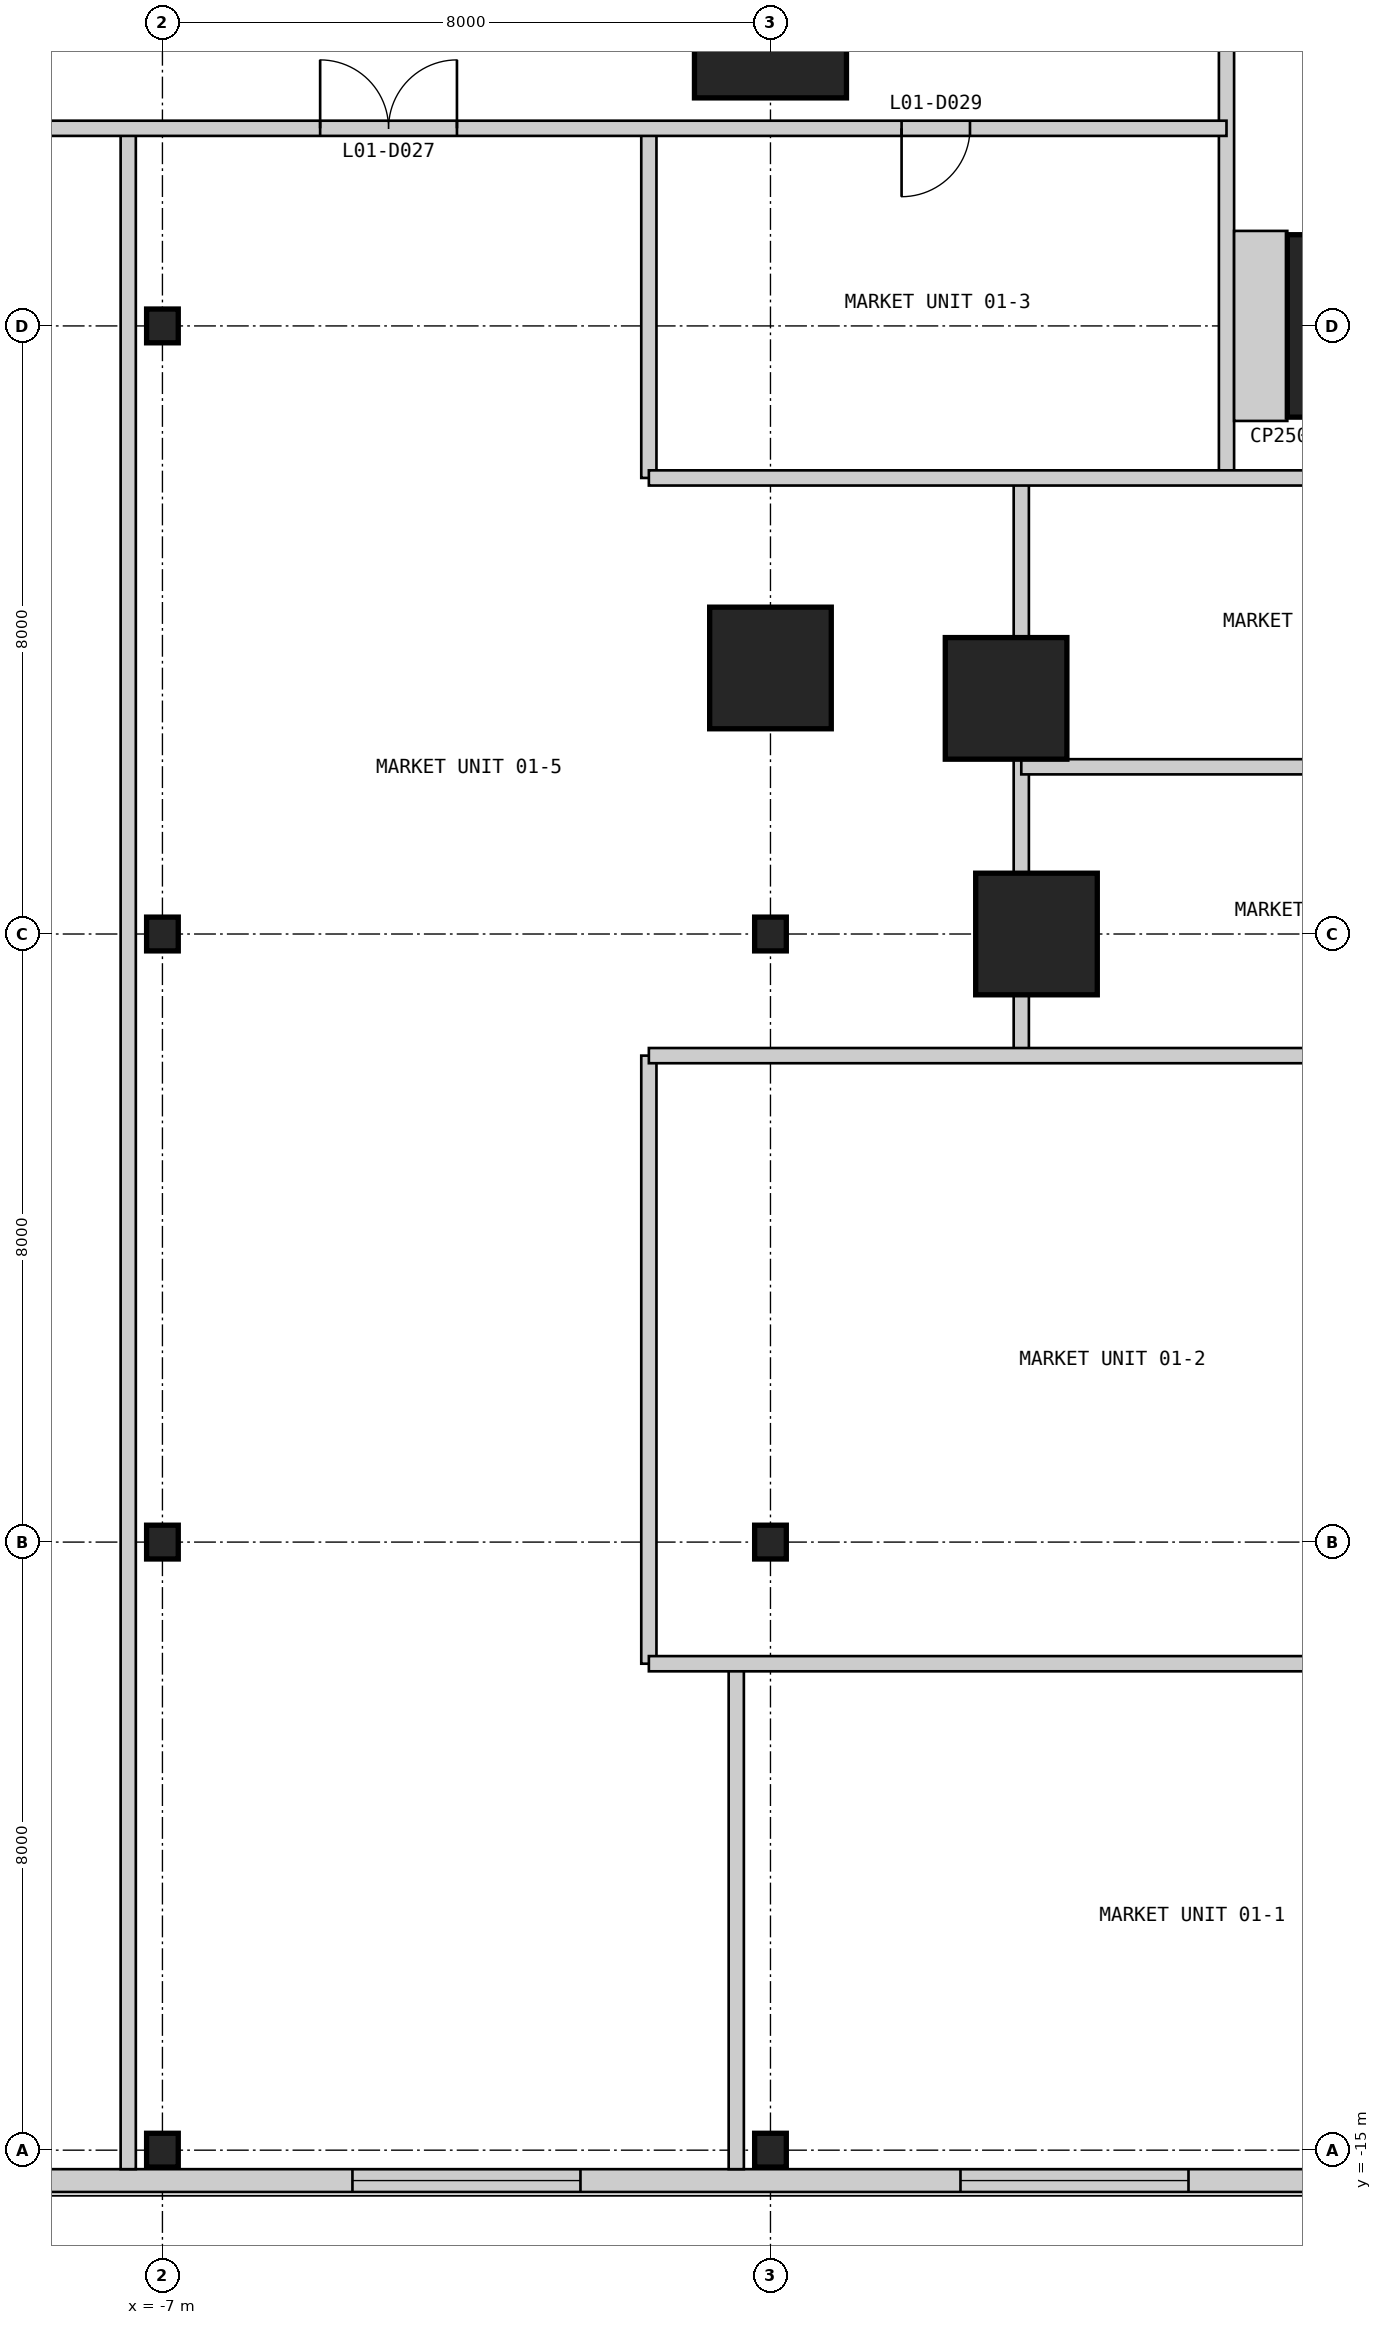
"""IFC4 building model, lengths in metres.
Left out: names, types, materials, properties, quantities, classifications, styles, units other than length and angle.
Written with IfcOpenShell. Run it as: python <this file> out.ifc"""

import sys

from ifc_helpers import new_model, si_unit, direction, frame, frame_2d, origin, origin_2d, place, context, subcontext, project, spatial, rectangle, i_section, extrude, element, fill, save


model = new_model("IFC4")
c1 = context("Model", 3, precision=1e-05, world=origin(), true_north=direction((0.0, 1.0)))
c2 = subcontext(c1, "Body", "Model", "MODEL_VIEW")
j1 = project(units=[si_unit("LENGTHUNIT", "METRE"), si_unit("PLANEANGLEUNIT", "RADIAN")], contexts=[c1])
p1 = place(None, origin())
s1 = spatial("IfcSite", under=j1, at=p1, CompositionType="ELEMENT")
p2 = place(p1, origin())
s2 = spatial("IfcBuilding", under=s1, at=p2, CompositionType="ELEMENT")
p3 = place(p2, frame((0.0, 0.0, 7.0)))
s3 = spatial("IfcBuildingStorey", under=s2, at=p3, CompositionType="ELEMENT", Elevation=7.0)
p4 = place(p3, frame((9.0, 9.0, 0.0), z_axis=(0.0, 0.0, 1.0), x_axis=(1.0, 0.0, 0.0)))
e1 = element("IfcColumn", 1, at=p4, inside=s3, PredefinedType="COLUMN", context=c2, shape_type="SweptSolid", body=[
    extrude(rectangle(XDim=2.4, YDim=2.4, at=origin_2d()), origin(), (0.0, 0.0, 1.0), 4.8),
])
p5 = place(p3, frame((4.5, 1.0, 0.0), z_axis=(0.0, 0.0, 1.0), x_axis=(1.0, 0.0, 0.0)))
e2 = element("IfcColumn", 2, at=p5, inside=s3, PredefinedType="COLUMN", context=c2, shape_type="SweptSolid", body=[
    extrude(rectangle(XDim=1.6, YDim=1.6, at=origin_2d()), origin(), (0.0, 0.0, 1.0), 4.8),
])
p6 = place(p3, frame((1.0, 13.0, 0.0), z_axis=(0.0, 0.0, 1.0), x_axis=(1.0, 0.0, 0.0)))
e3 = element("IfcColumn", 3, at=p6, inside=s3, PredefinedType="COLUMN", context=c2, shape_type="SweptSolid", body=[
    extrude(rectangle(XDim=2.0, YDim=2.0, at=origin_2d()), origin(), (0.0, 0.0, 1.0), 4.8),
])
for number, where, z_axis, x_axis in (
    (4, (1.0, 4.5, 0.0), (0.0, 0.0, 1.0), (1.0, 0.0, 0.0)),
    (5, (4.1, 4.1, 0.0), (0.0, 0.0, 1.0), (1.0, 0.0, 0.0)),
):
    element("IfcColumn", number, at=place(p3, frame(where, z_axis=z_axis, x_axis=x_axis)), inside=s3, PredefinedType="COLUMN", context=c2, shape_type="SweptSolid", body=[
        extrude(rectangle(XDim=1.6, YDim=1.6, at=origin_2d()), origin(), (0.0, 0.0, 1.0), 4.8),
    ])
for number, where, z_axis, x_axis in (
    (6, (-7.0, -15.0, 0.0), (0.0, 0.0, 1.0), (1.0, 0.0, 0.0)),
    (7, (-7.0, -7.0, 0.0), (0.0, 0.0, 1.0), (1.0, 0.0, 0.0)),
    (8, (-7.0, 1.0, 0.0), (0.0, 0.0, 1.0), (1.0, 0.0, 0.0)),
    (9, (-7.0, 9.0, 0.0), (0.0, 0.0, 1.0), (1.0, 0.0, 0.0)),
    (10, (1.0, -15.0, 0.0), (0.0, 0.0, 1.0), (1.0, 0.0, 0.0)),
    (11, (1.0, -7.0, 0.0), (0.0, 0.0, 1.0), (1.0, 0.0, 0.0)),
    (12, (1.0, 1.0, 0.0), (0.0, 0.0, 1.0), (1.0, 0.0, 0.0)),
):
    element("IfcColumn", number, at=place(p3, frame(where, z_axis=z_axis, x_axis=x_axis)), inside=s3, PredefinedType="COLUMN", context=c2, shape_type="SweptSolid", body=[
        extrude(i_section(OverallWidth=0.417, OverallDepth=0.445, WebThickness=0.039, FlangeThickness=0.063, at=origin_2d()), origin(), (0.0, 0.0, 1.0), 4.8),
    ])
p7 = place(p3, frame((-15.55, -15.4, 0.0), z_axis=(0.0, 0.0, 1.0), x_axis=(1.0, 0.0, 0.0)))
e13 = element("IfcWall", 13, at=p7, inside=s3, PredefinedType="SOLIDWALL", context=c2, shape_type="SweptSolid", body=[
    extrude(rectangle(XDim=81.1, YDim=0.3, at=frame_2d((40.55, 0.0))), origin(), (0.0, 0.0, 1.0), 4.5),
])
p8 = place(p7, frame((3.05, 0.0, 0.9)))
e14 = element("IfcOpeningElement", 14, at=p8, cuts=e13, PredefinedType="OPENING", context=c2, shape_type="SweptSolid", body=[
    extrude(rectangle(XDim=3.0, YDim=2.4, at=frame_2d((1.5, 1.2))), frame((0.0, 0.16, 0.0), z_axis=(0.0, -1.0, 0.0), x_axis=(1.0, 0.0, 0.0)), (0.0, 0.0, 1.0), 0.32),
])
p9 = place(p7, frame((11.05, 0.0, 0.9)))
e15 = element("IfcOpeningElement", 15, at=p9, cuts=e13, PredefinedType="OPENING", context=c2, shape_type="SweptSolid", body=[
    extrude(rectangle(XDim=3.0, YDim=2.4, at=frame_2d((1.5, 1.2))), frame((0.0, 0.16, 0.0), z_axis=(0.0, -1.0, 0.0), x_axis=(1.0, 0.0, 0.0)), (0.0, 0.0, 1.0), 0.32),
])
p10 = place(p7, frame((19.05, 0.0, 0.9)))
e16 = element("IfcOpeningElement", 16, at=p10, cuts=e13, PredefinedType="OPENING", context=c2, shape_type="SweptSolid", body=[
    extrude(rectangle(XDim=3.0, YDim=2.4, at=frame_2d((1.5, 1.2))), frame((0.0, 0.16, 0.0), z_axis=(0.0, -1.0, 0.0), x_axis=(1.0, 0.0, 0.0)), (0.0, 0.0, 1.0), 0.32),
])
p11 = place(p7, frame((33.05, 0.0, 0.9)))
e17 = element("IfcOpeningElement", 17, at=p11, cuts=e13, PredefinedType="OPENING", context=c2, shape_type="SweptSolid", body=[
    extrude(rectangle(XDim=3.0, YDim=2.4, at=frame_2d((1.5, 1.2))), frame((0.0, 0.16, 0.0), z_axis=(0.0, -1.0, 0.0), x_axis=(1.0, 0.0, 0.0)), (0.0, 0.0, 1.0), 0.32),
])
p12 = place(p7, frame((45.05, 0.0, 0.9)))
e18 = element("IfcOpeningElement", 18, at=p12, cuts=e13, PredefinedType="OPENING", context=c2, shape_type="SweptSolid", body=[
    extrude(rectangle(XDim=3.0, YDim=2.4, at=frame_2d((1.5, 1.2))), frame((0.0, 0.16, 0.0), z_axis=(0.0, -1.0, 0.0), x_axis=(1.0, 0.0, 0.0)), (0.0, 0.0, 1.0), 0.32),
])
p13 = place(p7, frame((53.55, 0.0, 0.9)))
e19 = element("IfcOpeningElement", 19, at=p13, cuts=e13, PredefinedType="OPENING", context=c2, shape_type="SweptSolid", body=[
    extrude(rectangle(XDim=3.0, YDim=2.4, at=frame_2d((1.5, 1.2))), frame((0.0, 0.16, 0.0), z_axis=(0.0, -1.0, 0.0), x_axis=(1.0, 0.0, 0.0)), (0.0, 0.0, 1.0), 0.32),
])
p14 = place(p7, frame((59.55, 0.0, 0.9)))
e20 = element("IfcOpeningElement", 20, at=p14, cuts=e13, PredefinedType="OPENING", context=c2, shape_type="SweptSolid", body=[
    extrude(rectangle(XDim=3.0, YDim=2.4, at=frame_2d((1.5, 1.2))), frame((0.0, 0.16, 0.0), z_axis=(0.0, -1.0, 0.0), x_axis=(1.0, 0.0, 0.0)), (0.0, 0.0, 1.0), 0.32),
])
p15 = place(p7, frame((67.05, 0.0, 0.9)))
e21 = element("IfcOpeningElement", 21, at=p15, cuts=e13, PredefinedType="OPENING", context=c2, shape_type="SweptSolid", body=[
    extrude(rectangle(XDim=3.0, YDim=2.4, at=frame_2d((1.5, 1.2))), frame((0.0, 0.16, 0.0), z_axis=(0.0, -1.0, 0.0), x_axis=(1.0, 0.0, 0.0)), (0.0, 0.0, 1.0), 0.32),
])
p16 = place(p7, frame((75.05, 0.0, 0.9)))
e22 = element("IfcOpeningElement", 22, at=p16, cuts=e13, PredefinedType="OPENING", context=c2, shape_type="SweptSolid", body=[
    extrude(rectangle(XDim=3.0, YDim=2.4, at=frame_2d((1.5, 1.2))), frame((0.0, 0.16, 0.0), z_axis=(0.0, -1.0, 0.0), x_axis=(1.0, 0.0, 0.0)), (0.0, 0.0, 1.0), 0.32),
])
p17 = place(p3, frame((-7.45, -15.25, 0.0), z_axis=(0.0, 0.0, 1.0), x_axis=(0.0, 1.0, 0.0)))
e23 = element("IfcWall", 23, at=p17, inside=s3, PredefinedType="PARTITIONING", context=c2, shape_type="SweptSolid", body=[
    extrude(rectangle(XDim=26.85, YDim=0.2, at=frame_2d((13.425, 0.0))), origin(), (0.0, 0.0, 1.0), 4.5),
])
p18 = place(p3, frame((-0.6, -8.6, 0.0), z_axis=(0.0, 0.0, 1.0), x_axis=(0.0, 1.0, 0.0)))
e24 = element("IfcWall", 24, at=p18, inside=s3, PredefinedType="PARTITIONING", context=c2, shape_type="SweptSolid", body=[
    extrude(rectangle(XDim=8.0, YDim=0.2, at=frame_2d((4.0, 0.0))), origin(), (0.0, 0.0, 1.0), 4.5),
])
p19 = place(p3, frame((-0.6, 7.0, 0.0), z_axis=(0.0, 0.0, 1.0), x_axis=(0.0, 1.0, 0.0)))
e25 = element("IfcWall", 25, at=p19, inside=s3, PredefinedType="PARTITIONING", context=c2, shape_type="SweptSolid", body=[
    extrude(rectangle(XDim=4.6, YDim=0.2, at=frame_2d((2.3, 0.0))), origin(), (0.0, 0.0, 1.0), 4.5),
])
p20 = place(p3, frame((0.55, -15.25, 0.0), z_axis=(0.0, 0.0, 1.0), x_axis=(0.0, 1.0, 0.0)))
e26 = element("IfcWall", 26, at=p20, inside=s3, PredefinedType="PARTITIONING", context=c2, shape_type="SweptSolid", body=[
    extrude(rectangle(XDim=6.65, YDim=0.2, at=frame_2d((3.325, 0.0))), origin(), (0.0, 0.0, 1.0), 4.5),
])
p21 = place(p3, frame((4.3, -0.6, 0.0), z_axis=(0.0, 0.0, 1.0), x_axis=(0.0, 1.0, 0.0)))
e27 = element("IfcWall", 27, at=p21, inside=s3, PredefinedType="PARTITIONING", context=c2, shape_type="SweptSolid", body=[
    extrude(rectangle(XDim=0.8, YDim=0.2, at=frame_2d((0.4, 0.0))), origin(), (0.0, 0.0, 1.0), 4.5),
])
p22 = place(p3, frame((4.3, 1.8, 0.0), z_axis=(0.0, 0.0, 1.0), x_axis=(0.0, 1.0, 0.0)))
e28 = element("IfcWall", 28, at=p22, inside=s3, PredefinedType="PARTITIONING", context=c2, shape_type="SweptSolid", body=[
    extrude(rectangle(XDim=1.5, YDim=0.2, at=frame_2d((0.75, 0.0))), origin(), (0.0, 0.0, 1.0), 3.65),
])
p23 = place(p3, frame((4.3, 4.9, 0.0), z_axis=(0.0, 0.0, 1.0), x_axis=(0.0, 1.0, 0.0)))
e29 = element("IfcWall", 29, at=p23, inside=s3, PredefinedType="PARTITIONING", context=c2, shape_type="SweptSolid", body=[
    extrude(rectangle(XDim=2.1, YDim=0.2, at=frame_2d((1.05, 0.0))), origin(), (0.0, 0.0, 1.0), 4.5),
])
p24 = place(p3, frame((7.0, 7.0, 0.0), z_axis=(0.0, 0.0, 1.0), x_axis=(0.0, 1.0, 0.0)))
e30 = element("IfcWall", 30, at=p24, inside=s3, PredefinedType="PARTITIONING", context=c2, shape_type="SweptSolid", body=[
    extrude(rectangle(XDim=6.0, YDim=0.2, at=frame_2d((3.0, 0.0))), origin(), (0.0, 0.0, 1.0), 4.5),
])
p25 = place(p3, frame((-0.6, -8.6, 0.0), z_axis=(0.0, 0.0, 1.0), x_axis=(1.0, 0.0, 0.0)))
e31 = element("IfcWall", 31, at=p25, inside=s3, PredefinedType="PARTITIONING", context=c2, shape_type="SweptSolid", body=[
    extrude(rectangle(XDim=13.15, YDim=0.2, at=frame_2d((6.575, 0.0))), origin(), (0.0, 0.0, 1.0), 4.5),
])
p26 = place(p3, frame((-0.6, -0.6, 0.0), z_axis=(0.0, 0.0, 1.0), x_axis=(1.0, 0.0, 0.0)))
e32 = element("IfcWall", 32, at=p26, inside=s3, PredefinedType="PARTITIONING", context=c2, shape_type="SweptSolid", body=[
    extrude(rectangle(XDim=12.2, YDim=0.2, at=frame_2d((6.1, 0.0))), origin(), (0.0, 0.0, 1.0), 4.5),
])
p27 = place(p3, frame((4.3, 3.2, 0.0), z_axis=(0.0, 0.0, 1.0), x_axis=(1.0, 0.0, 0.0)))
e33 = element("IfcWall", 33, at=p27, inside=s3, PredefinedType="PARTITIONING", context=c2, shape_type="SweptSolid", body=[
    extrude(rectangle(XDim=7.3, YDim=0.2, at=frame_2d((3.65, 0.0))), origin(), (0.0, 0.0, 1.0), 4.5),
])
p28 = place(p3, frame((-0.6, 7.0, 0.0), z_axis=(0.0, 0.0, 1.0), x_axis=(1.0, 0.0, 0.0)))
e34 = element("IfcWall", 34, at=p28, inside=s3, PredefinedType="PARTITIONING", context=c2, shape_type="SweptSolid", body=[
    extrude(rectangle(XDim=17.0, YDim=0.2, at=frame_2d((8.5, 0.0))), origin(), (0.0, 0.0, 1.0), 4.5),
])
p29 = place(p28, frame((14.125, 0.0, 0.0)))
e35 = element("IfcOpeningElement", 35, at=p29, cuts=e34, PredefinedType="OPENING", context=c2, shape_type="SweptSolid", body=[
    extrude(rectangle(XDim=0.9, YDim=2.2, at=frame_2d((0.45, 1.1))), frame((0.0, 0.11, 0.0), z_axis=(0.0, -1.0, 0.0), x_axis=(1.0, 0.0, 0.0)), (0.0, 0.0, 1.0), 0.22),
])
p30 = place(p3, frame((-15.25, 11.6, 0.0), z_axis=(0.0, 0.0, 1.0), x_axis=(1.0, 0.0, 0.0)))
e36 = element("IfcWall", 36, at=p30, inside=s3, PredefinedType="PARTITIONING", context=c2, shape_type="SweptSolid", body=[
    extrude(rectangle(XDim=22.25, YDim=0.2, at=frame_2d((11.125, 0.0))), origin(), (0.0, 0.0, 1.0), 4.5),
])
p31 = place(p30, frame((10.325, 0.0, 0.0)))
e37 = element("IfcOpeningElement", 37, at=p31, cuts=e36, PredefinedType="OPENING", context=c2, shape_type="SweptSolid", body=[
    extrude(rectangle(XDim=1.8, YDim=2.4, at=frame_2d((0.9, 1.2))), frame((0.0, 0.11, 0.0), z_axis=(0.0, -1.0, 0.0), x_axis=(1.0, 0.0, 0.0)), (0.0, 0.0, 1.0), 0.22),
])
p32 = place(p30, frame((3.025, 0.0, 0.0)))
e38 = element("IfcOpeningElement", 38, at=p32, cuts=e36, PredefinedType="OPENING", context=c2, shape_type="SweptSolid", body=[
    extrude(rectangle(XDim=1.8, YDim=2.4, at=frame_2d((0.9, 1.2))), frame((0.0, 0.11, 0.0), z_axis=(0.0, -1.0, 0.0), x_axis=(1.0, 0.0, 0.0)), (0.0, 0.0, 1.0), 0.22),
])
p33 = place(p30, frame((17.975, 0.0, 0.0)))
e39 = element("IfcOpeningElement", 39, at=p33, cuts=e36, PredefinedType="OPENING", context=c2, shape_type="SweptSolid", body=[
    extrude(rectangle(XDim=0.9, YDim=2.2, at=frame_2d((0.45, 1.1))), frame((0.0, 0.11, 0.0), z_axis=(0.0, -1.0, 0.0), x_axis=(1.0, 0.0, 0.0)), (0.0, 0.0, 1.0), 0.22),
])
p34 = place(p3, frame((7.1, 9.0, 0.0), z_axis=(0.0, 0.0, 1.0), x_axis=(1.0, 0.0, 0.0)))
e40 = element("IfcWall", 40, at=p34, inside=s3, PredefinedType="PARTITIONING", context=c2, shape_type="SweptSolid", body=[
    extrude(rectangle(XDim=0.7, YDim=2.5, at=frame_2d((0.35, 0.0))), origin(), (0.0, 0.0, 1.0), 4.5),
])
p35 = place(p9, origin())
e41 = element("IfcWindow", 41, at=p35, inside=s3, PartitioningType="SINGLE_PANEL", PredefinedType="WINDOW", context=c2, shape_type="SweptSolid", body=[
    extrude(rectangle(XDim=3.0, YDim=2.4, at=frame_2d((1.5, 1.2))), frame((0.0, 0.03, 0.0), z_axis=(0.0, -1.0, 0.0), x_axis=(1.0, 0.0, 0.0)), (0.0, 0.0, 1.0), 0.06),
])
fill(e15, e41)
p36 = place(p10, origin())
e42 = element("IfcWindow", 42, at=p36, inside=s3, PartitioningType="SINGLE_PANEL", PredefinedType="WINDOW", context=c2, shape_type="SweptSolid", body=[
    extrude(rectangle(XDim=3.0, YDim=2.4, at=frame_2d((1.5, 1.2))), frame((0.0, 0.03, 0.0), z_axis=(0.0, -1.0, 0.0), x_axis=(1.0, 0.0, 0.0)), (0.0, 0.0, 1.0), 0.06),
])
fill(e16, e42)
p37 = place(p31, origin())
e43 = element("IfcDoor", 43, at=p37, inside=s3, OperationType="DOUBLE_DOOR_SINGLE_SWING", PredefinedType="DOOR", context=c2, shape_type="SweptSolid", body=[
    extrude(rectangle(XDim=1.8, YDim=2.4, at=frame_2d((0.9, 1.2))), frame((0.0, 0.025, 0.0), z_axis=(0.0, -1.0, 0.0), x_axis=(1.0, 0.0, 0.0)), (0.0, 0.0, 1.0), 0.05),
])
fill(e37, e43)
p38 = place(p33, frame((0.9, 0.0, 0.0), z_axis=(0.0, 0.0, 1.0), x_axis=(-1.0, 0.0, 0.0)))
e44 = element("IfcDoor", 44, at=p38, inside=s3, OperationType="SINGLE_SWING_RIGHT", PredefinedType="DOOR", context=c2, shape_type="SweptSolid", body=[
    extrude(rectangle(XDim=0.9, YDim=2.2, at=frame_2d((0.45, 1.1))), frame((0.0, 0.025, 0.0), z_axis=(0.0, -1.0, 0.0), x_axis=(1.0, 0.0, 0.0)), (0.0, 0.0, 1.0), 0.05),
])
fill(e39, e44)
save(model, sys.argv[1])
